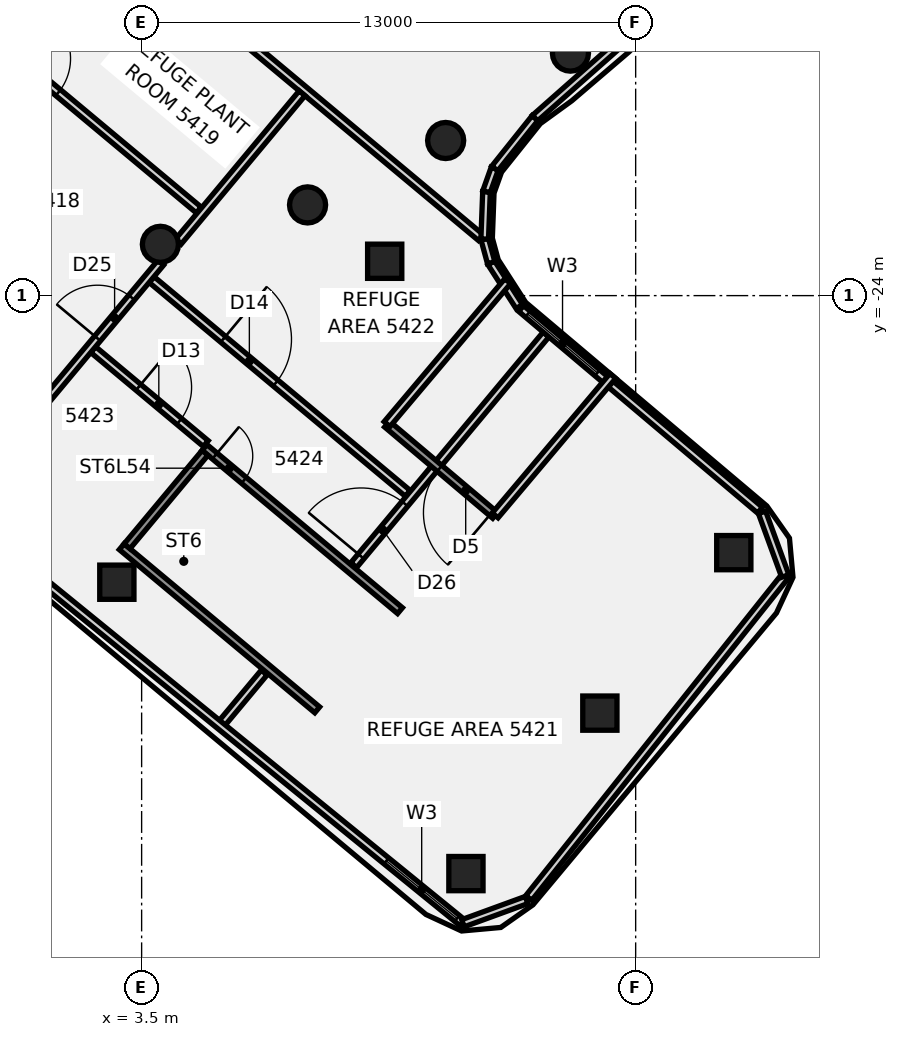
"""IFC4 building model, lengths in metres.
Left out: names, types, materials, properties, quantities, classifications, styles, units other than length and angle.
Written with IfcOpenShell. Run it as: python <this file> out.ifc"""

import sys

from ifc_helpers import new_model, si_unit, direction, frame, frame_2d, origin, origin_2d, place, context, subcontext, project, spatial, polyline, rectangle, circle, outline, extrude, element, fill, save


model = new_model("IFC4")
c1 = context("Model", 3, precision=1e-05, world=origin(), true_north=direction((0.0, 1.0)))
c2 = subcontext(c1, "Body", "Model", "MODEL_VIEW")
j1 = project(units=[si_unit("LENGTHUNIT", "METRE"), si_unit("PLANEANGLEUNIT", "RADIAN")], contexts=[c1])
p1 = place(None, origin())
s1 = spatial("IfcSite", under=j1, at=p1, CompositionType="ELEMENT")
p2 = place(p1, origin())
s2 = spatial("IfcBuilding", under=s1, at=p2, CompositionType="ELEMENT")
p3 = place(p2, frame((0.0, 0.0, 214.9)))
s3 = spatial("IfcBuildingStorey", under=s2, at=p3, CompositionType="ELEMENT", Elevation=214.9)
for number, where, z_axis, x_axis in (
    (1, (3.994, -22.651, -0.18), (0.0, 0.0, 1.0), (1.0, 0.0, 0.0)),
    (2, (7.866, -21.613, -0.18), (0.0, 0.0, 1.0), (1.0, 0.0, 0.0)),
    (3, (11.5, -19.919, -0.18), (0.0, 0.0, 1.0), (1.0, 0.0, 0.0)),
    (4, (14.784, -17.619, -0.18), (0.0, 0.0, 1.0), (1.0, 0.0, 0.0)),
):
    element("IfcColumn", number, at=place(p3, frame(where, z_axis=z_axis, x_axis=x_axis)), inside=s3, PredefinedType="COLUMN", context=c2, shape_type="SweptSolid", body=[
        extrude(circle(Radius=0.475, at=origin_2d()), origin(), (0.0, 0.0, 1.0), 5.04),
    ])
for number, where, z_axis, x_axis in (
    (5, (9.896, -23.096, -0.163), (0.0, 0.0, 1.0), (0.641, 0.768, 0.0)),
    (6, (2.848, -31.541, -0.163), (0.0, 0.0, 1.0), (0.641, 0.768, 0.0)),
):
    element("IfcColumn", number, at=place(p3, frame(where, z_axis=z_axis, x_axis=x_axis)), inside=s3, PredefinedType="COLUMN", context=c2, shape_type="SweptSolid", body=[
        extrude(rectangle(XDim=0.9, YDim=0.9, at=origin_2d()), origin(), (0.0, 0.0, 1.0), 4.913),
    ])
p4 = place(p3, frame((12.034, -39.208, -0.143), z_axis=(0.0, 0.0, 1.0), x_axis=(0.640774549773, 0.767729103501, 0.0)))
e7 = element("IfcColumn", 7, at=p4, inside=s3, PredefinedType="COLUMN", context=c2, shape_type="SweptSolid", body=[
    extrude(rectangle(XDim=0.9, YDim=0.9, at=origin_2d()), origin(), (0.0, 0.0, 1.0), 4.893),
])
p5 = place(p3, frame((15.558, -34.985, -0.137), z_axis=(0.0, 0.0, 1.0), x_axis=(0.640774549773, 0.767729103501, 0.0)))
e8 = element("IfcColumn", 8, at=p5, inside=s3, PredefinedType="COLUMN", context=c2, shape_type="SweptSolid", body=[
    extrude(rectangle(XDim=0.9, YDim=0.9, at=origin_2d()), origin(), (0.0, 0.0, 1.0), 4.887),
])
p6 = place(p3, frame((19.082, -30.763, -0.131), z_axis=(0.0, 0.0, 1.0), x_axis=(0.640774549773, 0.767729103501, 0.0)))
e9 = element("IfcColumn", 9, at=p6, inside=s3, PredefinedType="COLUMN", context=c2, shape_type="SweptSolid", body=[
    extrude(rectangle(XDim=0.9, YDim=0.9, at=origin_2d()), origin(), (0.0, 0.0, 1.0), 4.881),
])
p7 = place(p3, frame((-6.607, -12.057, 0.0), z_axis=(0.0, 0.0, 1.0), x_axis=(0.767718234812, -0.640787571615, 0.0)))
e10 = element("IfcWall", 10, at=p7, inside=s3, PredefinedType="PARTITIONING", context=c2, shape_type="SweptSolid", body=[
    extrude(rectangle(XDim=15.124, YDim=0.2, at=frame_2d((7.562, 0.0))), origin(), (0.0, 0.0, 1.0), 4.16),
])
p8 = place(p7, frame((8.905, 0.0, 0.0)))
e11 = element("IfcOpeningElement", 11, at=p8, cuts=e10, PredefinedType="OPENING", context=c2, shape_type="SweptSolid", body=[
    extrude(rectangle(XDim=1.4, YDim=2.1, at=frame_2d((0.7, 1.05))), frame((0.0, 0.11, 0.0), z_axis=(0.0, -1.0, 0.0), x_axis=(1.0, 0.0, 0.0)), (0.0, 0.0, 1.0), 0.22),
])
p9 = place(p3, frame((-0.052, -12.057, 0.0), z_axis=(0.0, 0.0, 1.0), x_axis=(0.767705248062, -0.64080313053, 0.0)))
e12 = element("IfcWall", 12, at=p9, inside=s3, PredefinedType="PARTITIONING", context=c2, shape_type="SweptSolid", body=[
    extrude(rectangle(XDim=16.257, YDim=0.2, at=frame_2d((8.128, 0.0))), origin(), (0.0, 0.0, 1.0), 4.16),
])
p10 = place(p3, frame((2.225, -25.42, 0.0), z_axis=(0.0, 0.0, 1.0), x_axis=(0.767749314301, -0.640750333898, 0.0)))
e13 = element("IfcWall", 13, at=p10, inside=s3, PredefinedType="PARTITIONING", context=c2, shape_type="SweptSolid", body=[
    extrude(rectangle(XDim=3.86, YDim=0.2, at=frame_2d((1.93, 0.0))), origin(), (0.0, 0.0, 1.0), 4.05),
])
p11 = place(p10, frame((1.55, 0.0, 0.0)))
e14 = element("IfcOpeningElement", 14, at=p11, cuts=e13, PredefinedType="OPENING", context=c2, shape_type="SweptSolid", body=[
    extrude(rectangle(XDim=1.4, YDim=2.1, at=frame_2d((0.7, 1.05))), frame((0.0, 0.11, 0.0), z_axis=(0.0, -1.0, 0.0), x_axis=(1.0, 0.0, 0.0)), (0.0, 0.0, 1.0), 0.22),
])
p12 = place(p3, frame((3.763, -23.578, 0.0), z_axis=(0.0, 0.0, 1.0), x_axis=(0.767756138221, -0.640742157365, 0.0)))
e15 = element("IfcWall", 15, at=p12, inside=s3, PredefinedType="PARTITIONING", context=c2, shape_type="SweptSolid", body=[
    extrude(rectangle(XDim=8.781, YDim=0.2, at=frame_2d((4.39, 0.0))), origin(), (0.0, 0.0, 1.0), 4.05),
])
p13 = place(p12, frame((2.45, 0.0, 0.0)))
e16 = element("IfcOpeningElement", 16, at=p13, cuts=e15, PredefinedType="OPENING", context=c2, shape_type="SweptSolid", body=[
    extrude(rectangle(XDim=1.8, YDim=2.1, at=frame_2d((0.9, 1.05))), frame((0.0, 0.11, 0.0), z_axis=(0.0, -1.0, 0.0), x_axis=(1.0, 0.0, 0.0)), (0.0, 0.0, 1.0), 0.22),
])
p14 = place(p3, frame((-1.375, -29.578, 0.0), z_axis=(0.0, 0.0, 1.0), x_axis=(0.6407249457, 0.767770502141, 0.0)))
e17 = element("IfcWall", 17, at=p14, inside=s3, PredefinedType="PARTITIONING", context=c2, shape_type="SweptSolid", body=[
    extrude(rectangle(XDim=8.394, YDim=0.2, at=frame_2d((4.197, 0.0))), origin(), (0.0, 0.0, 1.0), 4.15),
])
p15 = place(p14, frame((5.799, 0.0, 0.0)))
e18 = element("IfcOpeningElement", 18, at=p15, cuts=e17, PredefinedType="OPENING", context=c2, shape_type="SweptSolid", body=[
    extrude(rectangle(XDim=1.4, YDim=2.1, at=frame_2d((0.7, 1.05))), frame((0.0, 0.11, 0.0), z_axis=(0.0, -1.0, 0.0), x_axis=(1.0, 0.0, 0.0)), (0.0, 0.0, 1.0), 0.22),
])
p16 = place(p3, frame((4.461, -22.584, 0.0), z_axis=(0.0, 0.0, 1.0), x_axis=(0.640712685958, 0.767780733057, 0.0)))
e19 = element("IfcWall", 19, at=p16, inside=s3, PredefinedType="PARTITIONING", context=c2, shape_type="SweptSolid", body=[
    extrude(rectangle(XDim=5.09, YDim=0.2, at=frame_2d((2.545, 0.0))), origin(), (0.0, 0.0, 1.0), 4.16),
])
p17 = place(p3, frame((5.535, -35.345, 0.0), z_axis=(0.0, 0.0, 1.0), x_axis=(0.640455669919, 0.767995139873, 0.0)))
e20 = element("IfcWall", 20, at=p17, inside=s3, PredefinedType="PARTITIONING", context=c2, shape_type="SweptSolid", body=[
    extrude(rectangle(XDim=1.859, YDim=0.2, at=frame_2d((0.929, 0.0))), origin(), (0.0, 0.0, 1.0), 4.15),
])
p18 = place(p3, frame((9.082, -31.091, 0.0), z_axis=(0.0, 0.0, 1.0), x_axis=(0.640415410125, 0.768028712012, 0.0)))
e21 = element("IfcWall", 21, at=p18, inside=s3, PredefinedType="PARTITIONING", context=c2, shape_type="SweptSolid", body=[
    extrude(rectangle(XDim=7.899, YDim=0.2, at=frame_2d((3.95, 0.0))), origin(), (0.0, 0.0, 1.0), 4.15),
])
p19 = place(p18, frame((0.3, 0.0, 0.0)))
e22 = element("IfcOpeningElement", 22, at=p19, cuts=e21, PredefinedType="OPENING", context=c2, shape_type="SweptSolid", body=[
    extrude(rectangle(XDim=1.8, YDim=2.1, at=frame_2d((0.9, 1.05))), frame((0.0, 0.11, 0.0), z_axis=(0.0, -1.0, 0.0), x_axis=(1.0, 0.0, 0.0)), (0.0, 0.0, 1.0), 0.22),
])
p20 = place(p3, frame((-3.326, -28.081, 0.0), z_axis=(0.0, 0.0, 1.0), x_axis=(0.775707462679, -0.631092649572, 0.0)))
e23 = element("IfcWall", 23, at=p20, inside=s3, PredefinedType="SOLIDWALL", context=c2, shape_type="SweptSolid", body=[
    extrude(rectangle(XDim=19.7, YDim=0.2, at=frame_2d((9.85, 0.0))), origin(), (0.0, 0.0, 1.0), 4.86),
])
p21 = place(p20, frame((17.1, 0.0, 1.4)))
e24 = element("IfcOpeningElement", 24, at=p21, cuts=e23, PredefinedType="OPENING", context=c2, shape_type="SweptSolid", body=[
    extrude(rectangle(XDim=2.4, YDim=2.1, at=frame_2d((1.2, 1.05))), frame((0.0, 0.11, 0.0), z_axis=(0.0, -1.0, 0.0), x_axis=(1.0, 0.0, 0.0)), (0.0, 0.0, 1.0), 0.22),
])
p22 = place(p3, frame((11.955, -40.514, 0.0), z_axis=(0.0, 0.0, 1.0), x_axis=(0.939424603146, 0.342755619945, 0.0)))
e25 = element("IfcWall", 25, at=p22, inside=s3, PredefinedType="SOLIDWALL", context=c2, shape_type="SweptSolid", body=[
    extrude(rectangle(XDim=1.781, YDim=0.2, at=frame_2d((0.89, 0.0))), origin(), (0.0, 0.0, 1.0), 4.86),
])
p23 = place(p3, frame((13.687, -39.85, 0.0), z_axis=(0.0, 0.0, 1.0), x_axis=(0.623074903355, 0.78216217296, 0.0)))
e26 = element("IfcWall", 26, at=p23, inside=s3, PredefinedType="SOLIDWALL", context=c2, shape_type="SweptSolid", body=[
    extrude(rectangle(XDim=10.833, YDim=0.2, at=frame_2d((5.417, 0.0))), origin(), (0.0, 0.0, 1.0), 4.86),
])
p24 = place(p3, frame((20.436, -31.376, 0.0), z_axis=(0.0, 0.0, 1.0), x_axis=(-0.342832454601, 0.939396565925, 0.0)))
e27 = element("IfcWall", 27, at=p24, inside=s3, PredefinedType="SOLIDWALL", context=c2, shape_type="SweptSolid", body=[
    extrude(rectangle(XDim=1.781, YDim=0.2, at=frame_2d((0.891, 0.0))), origin(), (0.0, 0.0, 1.0), 4.86),
])
p25 = place(p3, frame((19.772, -29.645, 0.0), z_axis=(0.0, 0.0, 1.0), x_axis=(-0.764192749459, 0.64498793917, 0.0)))
e28 = element("IfcWall", 28, at=p25, inside=s3, PredefinedType="SOLIDWALL", context=c2, shape_type="SweptSolid", body=[
    extrude(rectangle(XDim=8.227, YDim=0.2, at=frame_2d((4.114, 0.0))), origin(), (0.0, 0.0, 1.0), 4.86),
])
p26 = place(p25, frame((5.6, 0.0, 1.4)))
e29 = element("IfcOpeningElement", 29, at=p26, cuts=e28, PredefinedType="OPENING", context=c2, shape_type="SweptSolid", body=[
    extrude(rectangle(XDim=2.4, YDim=2.1, at=frame_2d((1.2, 1.05))), frame((0.0, 0.11, 0.0), z_axis=(0.0, -1.0, 0.0), x_axis=(1.0, 0.0, 0.0)), (0.0, 0.0, 1.0), 0.22),
])
p27 = place(p3, frame((13.438, -24.287, 0.0), z_axis=(0.0, 0.0, 1.0), x_axis=(-0.540343058881, 0.841444816205, 0.0)))
e30 = element("IfcWall", 30, at=p27, inside=s3, PredefinedType="SOLIDWALL", context=c2, shape_type="SweptSolid", body=[
    extrude(rectangle(XDim=1.369, YDim=0.2, at=frame_2d((0.685, 0.0))), origin(), (0.0, 0.0, 1.0), 4.86),
])
p28 = place(p3, frame((12.698, -23.135, 0.0), z_axis=(0.0, 0.0, 1.0), x_axis=(-0.263532690811, 0.964650465648, 0.0)))
e31 = element("IfcWall", 31, at=p28, inside=s3, PredefinedType="SOLIDWALL", context=c2, shape_type="SweptSolid", body=[
    extrude(rectangle(XDim=0.647, YDim=0.2, at=frame_2d((0.323, 0.0))), origin(), (0.0, 0.0, 1.0), 4.86),
])
p29 = place(p3, frame((12.528, -22.511, 0.0), z_axis=(0.0, 0.0, 1.0), x_axis=(0.037627776093, 0.999291824477, 0.0)))
e32 = element("IfcWall", 32, at=p29, inside=s3, PredefinedType="SOLIDWALL", context=c2, shape_type="SweptSolid", body=[
    extrude(rectangle(XDim=1.246, YDim=0.2, at=frame_2d((0.623, 0.0))), origin(), (0.0, 0.0, 1.0), 4.86),
])
p30 = place(p3, frame((12.575, -21.266, 0.0), z_axis=(0.0, 0.0, 1.0), x_axis=(0.335669576077, 0.9419797958, 0.0)))
e33 = element("IfcWall", 33, at=p30, inside=s3, PredefinedType="SOLIDWALL", context=c2, shape_type="SweptSolid", body=[
    extrude(rectangle(XDim=0.649, YDim=0.2, at=frame_2d((0.325, 0.0))), origin(), (0.0, 0.0, 1.0), 4.86),
])
p31 = place(p3, frame((12.793, -20.655, 0.0), z_axis=(0.0, 0.0, 1.0), x_axis=(0.624309209942, 0.781177323264, 0.0)))
e34 = element("IfcWall", 34, at=p31, inside=s3, PredefinedType="SOLIDWALL", context=c2, shape_type="SweptSolid", body=[
    extrude(rectangle(XDim=1.698, YDim=0.2, at=frame_2d((0.849, 0.0))), origin(), (0.0, 0.0, 1.0), 4.86),
])
p32 = place(p3, frame((13.853, -19.328, 0.0), z_axis=(0.0, 0.0, 1.0), x_axis=(0.749682916513, 0.661797193019, 0.0)))
e35 = element("IfcWall", 35, at=p32, inside=s3, PredefinedType="SOLIDWALL", context=c2, shape_type="SweptSolid", body=[
    extrude(rectangle(XDim=4.967, YDim=0.2, at=frame_2d((2.483, 0.0))), origin(), (0.0, 0.0, 1.0), 4.86),
])
p33 = place(p3, frame((12.803, -29.782, 0.0), z_axis=(0.0, 0.0, 1.0), x_axis=(-0.764169256324, 0.645015773209, 0.0)))
e36 = element("IfcWall", 36, at=p33, inside=s3, PredefinedType="SOLIDWALL", context=c2, shape_type="SweptSolid", body=[
    extrude(rectangle(XDim=3.723, YDim=0.2, at=frame_2d((1.861, 0.0))), origin(), (0.0, 0.0, 1.0), 4.05),
])
p34 = place(p33, frame((0.115, 0.0, 0.0)))
e37 = element("IfcOpeningElement", 37, at=p34, cuts=e36, PredefinedType="OPENING", context=c2, shape_type="SweptSolid", body=[
    extrude(rectangle(XDim=1.8, YDim=2.4, at=frame_2d((0.9, 1.2))), frame((0.0, 0.11, 0.0), z_axis=(0.0, -1.0, 0.0), x_axis=(1.0, 0.0, 0.0)), (0.0, 0.0, 1.0), 0.22),
])
p35 = place(p3, frame((12.803, -29.782, 0.0), z_axis=(0.0, 0.0, 1.0), x_axis=(0.645004631952, 0.764178660236, 0.0)))
e38 = element("IfcWall", 38, at=p35, inside=s3, PredefinedType="SOLIDWALL", context=c2, shape_type="SweptSolid", body=[
    extrude(rectangle(XDim=4.8, YDim=0.2, at=frame_2d((2.4, 0.0))), origin(), (0.0, 0.0, 1.0), 4.15),
])
p36 = place(p3, frame((9.958, -27.381, 0.0), z_axis=(0.0, 0.0, 1.0), x_axis=(0.644947890553, 0.76422654918, 0.0)))
e39 = element("IfcWall", 39, at=p36, inside=s3, PredefinedType="SOLIDWALL", context=c2, shape_type="SweptSolid", body=[
    extrude(rectangle(XDim=4.923, YDim=0.2, at=frame_2d((2.461, 0.0))), origin(), (0.0, 0.0, 1.0), 4.15),
])
p37 = place(p3, frame((5.155, -27.996, -0.18), z_axis=(0.0, 0.0, 1.0), x_axis=(0.767728232678, -0.640775593129, 0.0)))
e40 = element("IfcWall", 40, at=p37, inside=s3, PredefinedType="SHEAR", context=c2, shape_type="SweptSolid", body=[
    extrude(rectangle(XDim=6.7, YDim=0.2, at=frame_2d((3.35, 0.0))), origin(), (0.0, 0.0, 1.0), 4.23),
])
p38 = place(p37, frame((0.35, 0.0, 0.0)))
e41 = element("IfcOpeningElement", 41, at=p38, cuts=e40, PredefinedType="OPENING", context=c2, shape_type="SweptSolid", body=[
    extrude(rectangle(XDim=1.0, YDim=2.1, at=frame_2d((0.5, 1.05))), frame((0.0, 0.11, 0.0), z_axis=(0.0, -1.0, 0.0), x_axis=(1.0, 0.0, 0.0)), (0.0, 0.0, 1.0), 0.22),
])
p39 = place(p3, frame((2.977, -30.606, -0.18), z_axis=(0.0, 0.0, 1.0), x_axis=(0.767728232678, -0.640775593129, 0.0)))
e42 = element("IfcWall", 42, at=p39, inside=s3, PredefinedType="SHEAR", context=c2, shape_type="SweptSolid", body=[
    extrude(rectangle(XDim=6.7, YDim=0.2, at=frame_2d((3.35, 0.0))), origin(), (0.0, 0.0, 1.0), 4.23),
])
p40 = place(p3, frame((3.117, -30.594, -0.18), z_axis=(0.0, 0.0, 1.0), x_axis=(0.640777035898, 0.767727028485, 0.0)))
e43 = element("IfcWall", 43, at=p40, inside=s3, PredefinedType="SHEAR", context=c2, shape_type="SweptSolid", body=[
    extrude(rectangle(XDim=3.2, YDim=0.2, at=frame_2d((1.6, 0.0))), origin(), (0.0, 0.0, 1.0), 4.23),
])
p41 = place(p3, frame((0.0, 0.0, -0.18)))
e44 = element("IfcWall", 44, at=p41, inside=s3, PredefinedType="SHEAR", context=c2, shape_type="SweptSolid", body=[
    extrude(outline(polyline([(8.031, -34.695), (8.185, -34.823), (10.235, -32.366), (10.081, -32.238), (8.031, -34.695)])), origin(), (0.0, 0.0, 1.0), 4.23),
])
p42 = place(p8, origin())
e45 = element("IfcDoor", 45, at=p42, inside=s3, OperationType="DOUBLE_DOOR_SINGLE_SWING", PredefinedType="DOOR", context=c2, shape_type="SweptSolid", body=[
    extrude(rectangle(XDim=1.4, YDim=2.1, at=frame_2d((0.7, 1.05))), frame((0.0, 0.025, 0.0), z_axis=(0.0, -1.0, 0.0), x_axis=(1.0, 0.0, 0.0)), (0.0, 0.0, 1.0), 0.05),
])
fill(e11, e45)
p43 = place(p11, frame((1.4, 0.0, 0.0), z_axis=(0.0, 0.0, 1.0), x_axis=(-1.0, 0.0, 0.0)))
e46 = element("IfcDoor", 46, at=p43, inside=s3, OperationType="DOUBLE_DOOR_SINGLE_SWING", PredefinedType="DOOR", context=c2, shape_type="SweptSolid", body=[
    extrude(rectangle(XDim=1.4, YDim=2.1, at=frame_2d((0.7, 1.05))), frame((0.0, 0.025, 0.0), z_axis=(0.0, -1.0, 0.0), x_axis=(1.0, 0.0, 0.0)), (0.0, 0.0, 1.0), 0.05),
])
fill(e14, e46)
p44 = place(p13, origin())
e47 = element("IfcDoor", 47, at=p44, inside=s3, OperationType="DOUBLE_DOOR_SINGLE_SWING", PredefinedType="DOOR", context=c2, shape_type="SweptSolid", body=[
    extrude(rectangle(XDim=1.8, YDim=2.1, at=frame_2d((0.9, 1.05))), frame((0.0, 0.025, 0.0), z_axis=(0.0, -1.0, 0.0), x_axis=(1.0, 0.0, 0.0)), (0.0, 0.0, 1.0), 0.05),
])
fill(e16, e47)
p45 = place(p15, origin())
e48 = element("IfcDoor", 48, at=p45, inside=s3, OperationType="DOUBLE_DOOR_SINGLE_SWING", PredefinedType="DOOR", context=c2, shape_type="SweptSolid", body=[
    extrude(rectangle(XDim=1.4, YDim=2.1, at=frame_2d((0.7, 1.05))), frame((0.0, 0.025, 0.0), z_axis=(0.0, -1.0, 0.0), x_axis=(1.0, 0.0, 0.0)), (0.0, 0.0, 1.0), 0.05),
])
fill(e18, e48)
p46 = place(p19, frame((1.8, 0.0, 0.0), z_axis=(0.0, 0.0, 1.0), x_axis=(-1.0, 0.0, 0.0)))
e49 = element("IfcDoor", 49, at=p46, inside=s3, OperationType="DOUBLE_DOOR_SINGLE_SWING", PredefinedType="DOOR", context=c2, shape_type="SweptSolid", body=[
    extrude(rectangle(XDim=1.8, YDim=2.1, at=frame_2d((0.9, 1.05))), frame((0.0, 0.025, 0.0), z_axis=(0.0, -1.0, 0.0), x_axis=(1.0, 0.0, 0.0)), (0.0, 0.0, 1.0), 0.05),
])
fill(e22, e49)
p47 = place(p21, origin())
e50 = element("IfcWindow", 50, at=p47, inside=s3, PartitioningType="SINGLE_PANEL", PredefinedType="WINDOW", context=c2, shape_type="SweptSolid", body=[
    extrude(rectangle(XDim=2.4, YDim=2.1, at=frame_2d((1.2, 1.05))), frame((0.0, 0.03, 0.0), z_axis=(0.0, -1.0, 0.0), x_axis=(1.0, 0.0, 0.0)), (0.0, 0.0, 1.0), 0.06),
])
fill(e24, e50)
p48 = place(p26, origin())
e51 = element("IfcWindow", 51, at=p48, inside=s3, PartitioningType="SINGLE_PANEL", PredefinedType="WINDOW", context=c2, shape_type="SweptSolid", body=[
    extrude(rectangle(XDim=2.4, YDim=2.1, at=frame_2d((1.2, 1.05))), frame((0.0, 0.03, 0.0), z_axis=(0.0, -1.0, 0.0), x_axis=(1.0, 0.0, 0.0)), (0.0, 0.0, 1.0), 0.06),
])
fill(e29, e51)
p49 = place(p34, origin())
e52 = element("IfcDoor", 52, at=p49, inside=s3, OperationType="SINGLE_SWING_LEFT", PredefinedType="DOOR", context=c2, shape_type="SweptSolid", body=[
    extrude(rectangle(XDim=1.8, YDim=2.4, at=frame_2d((0.9, 1.2))), frame((0.0, 0.025, 0.0), z_axis=(0.0, -1.0, 0.0), x_axis=(1.0, 0.0, 0.0)), (0.0, 0.0, 1.0), 0.05),
])
fill(e37, e52)
p50 = place(p38, origin())
e53 = element("IfcDoor", 53, at=p50, inside=s3, OperationType="SINGLE_SWING_LEFT", PredefinedType="DOOR", context=c2, shape_type="SweptSolid", body=[
    extrude(rectangle(XDim=1.0, YDim=2.1, at=frame_2d((0.5, 1.05))), frame((0.0, 0.025, 0.0), z_axis=(0.0, -1.0, 0.0), x_axis=(1.0, 0.0, 0.0)), (0.0, 0.0, 1.0), 0.05),
])
fill(e41, e53)
save(model, sys.argv[1])
